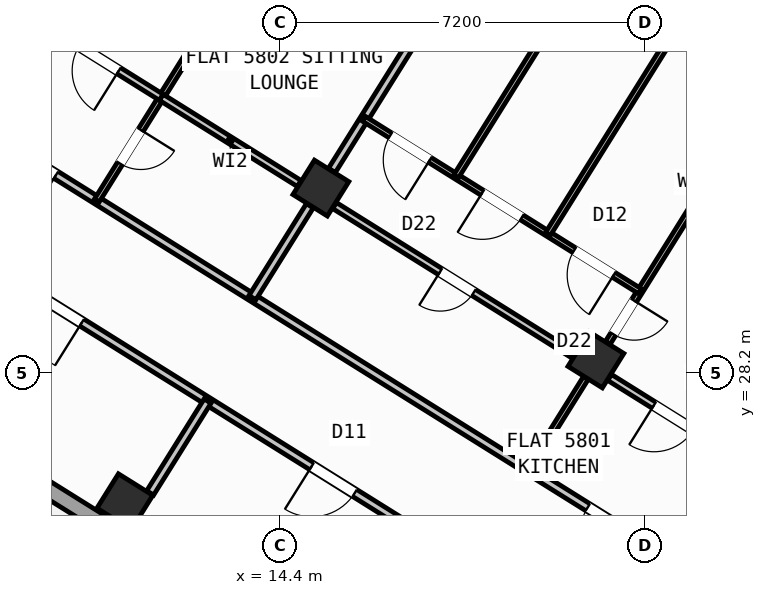
"""IFC4 building model, lengths in metres.
Left out: names, types, materials, properties, quantities, classifications, styles, units other than length and angle.
Written with IfcOpenShell. Run it as: python <this file> out.ifc"""

import sys

from ifc_helpers import new_model, si_unit, direction, frame, frame_2d, origin, origin_2d, place, context, subcontext, project, spatial, rectangle, hollow_rectangle, extrude, source, transform, mapped, element, fill, save


model = new_model("IFC4")
c1 = context("Model", 3, precision=1e-05, world=origin(), true_north=direction((0.0, 1.0)))
c2 = subcontext(c1, "Body", "Model", "MODEL_VIEW")
j1 = project(units=[si_unit("LENGTHUNIT", "METRE"), si_unit("PLANEANGLEUNIT", "RADIAN")], contexts=[c1])
p1 = place(None, origin())
s1 = spatial("IfcSite", under=j1, at=p1, CompositionType="ELEMENT")
p2 = place(p1, origin())
s2 = spatial("IfcBuilding", under=s1, at=p2, CompositionType="ELEMENT")
p3 = place(p2, frame((0.0, 0.0, 229.2)))
s3 = spatial("IfcBuildingStorey", under=s2, at=p3, CompositionType="ELEMENT", Elevation=229.2)
m1 = source(origin(), c2, "Body", "SweptSolid", [
    extrude(hollow_rectangle(XDim=0.8, YDim=0.8, WallThickness=0.032, at=origin_2d()), origin(), (0.0, 0.0, 1.0), 4.5),
])
for number, where, z_axis, x_axis in (
    (1, (20.632, 28.452, 0.0), (0.0, 0.0, 1.0), (-0.848, 0.53, 0.0)),
    (2, (15.205, 31.844, 0.0), (0.0, 0.0, 1.0), (-0.848, 0.53, 0.0)),
    (3, (11.336, 25.653, 0.0), (0.0, 0.0, 1.0), (-0.848, 0.53, 0.0)),
):
    element("IfcColumn", number, at=place(p3, frame(where, z_axis=z_axis, x_axis=x_axis)), inside=s3, PredefinedType="COLUMN", context=c2, shape_type="MappedRepresentation", body=[
        mapped(m1, transform((0.0, 0.0, 0.0), scale=1.0)),
    ])
p4 = place(p3, frame((31.76, 12.183, 0.0), z_axis=(0.0, 0.0, 1.0), x_axis=(-0.848047074256, 0.529920899612, 0.0)))
e4 = element("IfcWall", 4, at=p4, inside=s3, PredefinedType="STANDARD", context=c2, shape_type="SweptSolid", body=[
    extrude(rectangle(XDim=30.652, YDim=0.32, at=frame_2d((15.326, 0.0))), origin(), (0.0, 0.0, 1.0), 4.22),
])
p5 = place(p4, frame((14.966, 0.0, 0.0)))
e5 = element("IfcOpeningElement", 5, at=p5, cuts=e4, PredefinedType="OPENING", context=c2, shape_type="SweptSolid", body=[
    extrude(rectangle(XDim=1.2, YDim=2.15, at=frame_2d((0.6, 1.075))), frame((0.0, 0.17, 0.0), z_axis=(0.0, -1.0, 0.0), x_axis=(1.0, 0.0, 0.0)), (0.0, 0.0, 1.0), 0.34),
])
p6 = place(p4, frame((2.096, 0.0, 0.9)))
e6 = element("IfcOpeningElement", 6, at=p6, cuts=e4, PredefinedType="OPENING", context=c2, shape_type="SweptSolid", body=[
    extrude(rectangle(XDim=1.65, YDim=1.45, at=frame_2d((0.825, 0.725))), frame((0.0, 0.17, 0.0), z_axis=(0.0, -1.0, 0.0), x_axis=(1.0, 0.0, 0.0)), (0.0, 0.0, 1.0), 0.34),
])
p7 = place(p4, frame((6.771, 0.0, 0.9)))
e7 = element("IfcOpeningElement", 7, at=p7, cuts=e4, PredefinedType="OPENING", context=c2, shape_type="SweptSolid", body=[
    extrude(rectangle(XDim=1.65, YDim=1.45, at=frame_2d((0.825, 0.725))), frame((0.0, 0.17, 0.0), z_axis=(0.0, -1.0, 0.0), x_axis=(1.0, 0.0, 0.0)), (0.0, 0.0, 1.0), 0.34),
])
p8 = place(p4, frame((20.283, 0.0, 0.95)))
e8 = element("IfcOpeningElement", 8, at=p8, cuts=e4, PredefinedType="OPENING", context=c2, shape_type="SweptSolid", body=[
    extrude(rectangle(XDim=1.95, YDim=1.35, at=frame_2d((0.975, 0.675))), frame((0.0, 0.17, 0.0), z_axis=(0.0, -1.0, 0.0), x_axis=(1.0, 0.0, 0.0)), (0.0, 0.0, 1.0), 0.34),
])
p9 = place(p4, frame((27.208, 0.0, 1.0)))
e9 = element("IfcOpeningElement", 9, at=p9, cuts=e4, PredefinedType="OPENING", context=c2, shape_type="SweptSolid", body=[
    extrude(rectangle(XDim=0.9, YDim=1.25, at=frame_2d((0.45, 0.625))), frame((0.0, 0.17, 0.0), z_axis=(0.0, -1.0, 0.0), x_axis=(1.0, 0.0, 0.0)), (0.0, 0.0, 1.0), 0.34),
])
p10 = place(p3, frame((5.7, 28.71, 0.0), z_axis=(0.0, 0.0, 1.0), x_axis=(0.529923711467, 0.8480453172, 0.0)))
e10 = element("IfcWall", 10, at=p10, inside=s3, PredefinedType="STANDARD", context=c2, shape_type="SweptSolid", body=[
    extrude(rectangle(XDim=21.587, YDim=0.32, at=frame_2d((10.794, 0.0))), origin(), (0.0, 0.0, 1.0), 2.395),
])
p11 = place(p10, frame((5.859, 0.0, 1.0)))
e11 = element("IfcOpeningElement", 11, at=p11, cuts=e10, PredefinedType="OPENING", context=c2, shape_type="SweptSolid", body=[
    extrude(rectangle(XDim=0.9, YDim=1.25, at=frame_2d((0.45, 0.625))), frame((0.0, 0.17, 0.0), z_axis=(0.0, -1.0, 0.0), x_axis=(1.0, 0.0, 0.0)), (0.0, 0.0, 1.0), 0.34),
])
p12 = place(p10, frame((9.444, 0.0, 1.0)))
e12 = element("IfcOpeningElement", 12, at=p12, cuts=e10, PredefinedType="OPENING", context=c2, shape_type="SweptSolid", body=[
    extrude(rectangle(XDim=0.9, YDim=1.25, at=frame_2d((0.45, 0.625))), frame((0.0, 0.17, 0.0), z_axis=(0.0, -1.0, 0.0), x_axis=(1.0, 0.0, 0.0)), (0.0, 0.0, 1.0), 0.34),
])
p13 = place(p10, frame((12.344, 0.0, 1.0)))
e13 = element("IfcOpeningElement", 13, at=p13, cuts=e10, PredefinedType="OPENING", context=c2, shape_type="SweptSolid", body=[
    extrude(rectangle(XDim=0.9, YDim=1.25, at=frame_2d((0.45, 0.625))), frame((0.0, 0.17, 0.0), z_axis=(0.0, -1.0, 0.0), x_axis=(1.0, 0.0, 0.0)), (0.0, 0.0, 1.0), 0.34),
])
p14 = place(p10, frame((16.5, 0.0, 1.0)))
e14 = element("IfcOpeningElement", 14, at=p14, cuts=e10, PredefinedType="OPENING", context=c2, shape_type="SweptSolid", body=[
    extrude(rectangle(XDim=0.9, YDim=1.25, at=frame_2d((0.45, 0.625))), frame((0.0, 0.17, 0.0), z_axis=(0.0, -1.0, 0.0), x_axis=(1.0, 0.0, 0.0)), (0.0, 0.0, 1.0), 0.34),
])
p15 = place(p10, frame((18.913, 0.0, 1.0)))
e15 = element("IfcOpeningElement", 15, at=p15, cuts=e10, PredefinedType="OPENING", context=c2, shape_type="SweptSolid", body=[
    extrude(rectangle(XDim=0.9, YDim=1.25, at=frame_2d((0.45, 0.625))), frame((0.0, 0.17, 0.0), z_axis=(0.0, -1.0, 0.0), x_axis=(1.0, 0.0, 0.0)), (0.0, 0.0, 1.0), 0.34),
])
p16 = place(p3, frame((17.424, 47.083, 0.0), z_axis=(0.0, 0.0, 1.0), x_axis=(0.848049927979, -0.529916332693, 0.0)))
e16 = element("IfcWall", 16, at=p16, inside=s3, PredefinedType="STANDARD", context=c2, shape_type="SweptSolid", body=[
    extrude(rectangle(XDim=29.223, YDim=0.32, at=frame_2d((14.612, 0.0))), origin(), (0.0, 0.0, 1.0), 4.22),
])
p17 = place(p16, frame((3.709, 0.0, 0.0)))
e17 = element("IfcOpeningElement", 17, at=p17, cuts=e16, PredefinedType="OPENING", context=c2, shape_type="SweptSolid", body=[
    extrude(rectangle(XDim=1.05, YDim=2.15, at=frame_2d((0.525, 1.075))), frame((0.0, 0.17, 0.0), z_axis=(0.0, -1.0, 0.0), x_axis=(1.0, 0.0, 0.0)), (0.0, 0.0, 1.0), 0.34),
])
p18 = place(p16, frame((0.809, 0.0, 1.0)))
e18 = element("IfcOpeningElement", 18, at=p18, cuts=e16, PredefinedType="OPENING", context=c2, shape_type="SweptSolid", body=[
    extrude(rectangle(XDim=0.9, YDim=1.25, at=frame_2d((0.45, 0.625))), frame((0.0, 0.17, 0.0), z_axis=(0.0, -1.0, 0.0), x_axis=(1.0, 0.0, 0.0)), (0.0, 0.0, 1.0), 0.34),
])
p19 = place(p16, frame((13.811, 0.0, 0.9)))
e19 = element("IfcOpeningElement", 19, at=p19, cuts=e16, PredefinedType="OPENING", context=c2, shape_type="SweptSolid", body=[
    extrude(rectangle(XDim=1.35, YDim=1.45, at=frame_2d((0.675, 0.725))), frame((0.0, 0.17, 0.0), z_axis=(0.0, -1.0, 0.0), x_axis=(1.0, 0.0, 0.0)), (0.0, 0.0, 1.0), 0.34),
])
p20 = place(p16, frame((17.254, 0.0, 1.0)))
e20 = element("IfcOpeningElement", 20, at=p20, cuts=e16, PredefinedType="OPENING", context=c2, shape_type="SweptSolid", body=[
    extrude(rectangle(XDim=0.9, YDim=1.25, at=frame_2d((0.45, 0.625))), frame((0.0, 0.17, 0.0), z_axis=(0.0, -1.0, 0.0), x_axis=(1.0, 0.0, 0.0)), (0.0, 0.0, 1.0), 0.34),
])
p21 = place(p16, frame((21.364, 0.0, 1.0)))
e21 = element("IfcOpeningElement", 21, at=p21, cuts=e16, PredefinedType="OPENING", context=c2, shape_type="SweptSolid", body=[
    extrude(rectangle(XDim=0.9, YDim=1.25, at=frame_2d((0.45, 0.625))), frame((0.0, 0.17, 0.0), z_axis=(0.0, -1.0, 0.0), x_axis=(1.0, 0.0, 0.0)), (0.0, 0.0, 1.0), 0.34),
])
p22 = place(p16, frame((26.003, 0.0, 1.0)))
e22 = element("IfcOpeningElement", 22, at=p22, cuts=e16, PredefinedType="OPENING", context=c2, shape_type="SweptSolid", body=[
    extrude(rectangle(XDim=0.9, YDim=1.25, at=frame_2d((0.45, 0.625))), frame((0.0, 0.17, 0.0), z_axis=(0.0, -1.0, 0.0), x_axis=(1.0, 0.0, 0.0)), (0.0, 0.0, 1.0), 0.34),
])
p23 = place(p16, frame((11.211, 0.0, 1.0)))
e23 = element("IfcOpeningElement", 23, at=p23, cuts=e16, PredefinedType="OPENING", context=c2, shape_type="SweptSolid", body=[
    extrude(rectangle(XDim=0.65, YDim=1.15, at=frame_2d((0.325, 0.575))), frame((0.0, 0.17, 0.0), z_axis=(0.0, -1.0, 0.0), x_axis=(1.0, 0.0, 0.0)), (0.0, 0.0, 1.0), 0.34),
])
p24 = place(p16, frame((9.079, 0.0, 1.0)))
e24 = element("IfcOpeningElement", 24, at=p24, cuts=e16, PredefinedType="OPENING", context=c2, shape_type="SweptSolid", body=[
    extrude(rectangle(XDim=0.65, YDim=1.15, at=frame_2d((0.325, 0.575))), frame((0.0, 0.17, 0.0), z_axis=(0.0, -1.0, 0.0), x_axis=(1.0, 0.0, 0.0)), (0.0, 0.0, 1.0), 0.34),
])
p25 = place(p16, frame((6.951, 0.0, 1.0)))
e25 = element("IfcOpeningElement", 25, at=p25, cuts=e16, PredefinedType="OPENING", context=c2, shape_type="SweptSolid", body=[
    extrude(rectangle(XDim=0.65, YDim=1.15, at=frame_2d((0.325, 0.575))), frame((0.0, 0.17, 0.0), z_axis=(0.0, -1.0, 0.0), x_axis=(1.0, 0.0, 0.0)), (0.0, 0.0, 1.0), 0.34),
])
p26 = place(p3, frame((22.495, 24.281, 0.0), z_axis=(0.0, 0.0, 1.0), x_axis=(-0.848052408131, 0.529912363569, 0.0)))
e26 = element("IfcWall", 26, at=p26, inside=s3, PredefinedType="PARTITIONING", context=c2, shape_type="SweptSolid", body=[
    extrude(rectangle(XDim=16.73, YDim=0.16, at=frame_2d((8.365, 0.0))), origin(), (0.0, 0.0, 1.0), 4.21),
])
p27 = place(p26, frame((1.385, 0.0, 0.0)))
e27 = element("IfcOpeningElement", 27, at=p27, cuts=e26, PredefinedType="OPENING", context=c2, shape_type="SweptSolid", body=[
    extrude(rectangle(XDim=1.0, YDim=2.1, at=frame_2d((0.5, 1.05))), frame((0.0, 0.09, 0.0), z_axis=(0.0, -1.0, 0.0), x_axis=(1.0, 0.0, 0.0)), (0.0, 0.0, 1.0), 0.18),
])
p28 = place(p26, frame((14.76, 0.0, 0.0)))
e28 = element("IfcOpeningElement", 28, at=p28, cuts=e26, PredefinedType="OPENING", context=c2, shape_type="SweptSolid", body=[
    extrude(rectangle(XDim=1.0, YDim=2.1, at=frame_2d((0.5, 1.05))), frame((0.0, 0.09, 0.0), z_axis=(0.0, -1.0, 0.0), x_axis=(1.0, 0.0, 0.0)), (0.0, 0.0, 1.0), 0.18),
])
p29 = place(p3, frame((21.329, 22.416, 0.0), z_axis=(0.0, 0.0, 1.0), x_axis=(-0.848052408131, 0.529912363569, 0.0)))
e29 = element("IfcWall", 29, at=p29, inside=s3, PredefinedType="PARTITIONING", context=c2, shape_type="SweptSolid", body=[
    extrude(rectangle(XDim=16.73, YDim=0.16, at=frame_2d((8.365, 0.0))), origin(), (0.0, 0.0, 1.0), 4.21),
])
p30 = place(p29, frame((1.505, 0.0, 0.0)))
e30 = element("IfcOpeningElement", 30, at=p30, cuts=e29, PredefinedType="OPENING", context=c2, shape_type="SweptSolid", body=[
    extrude(rectangle(XDim=1.0, YDim=2.1, at=frame_2d((0.5, 1.05))), frame((0.0, 0.09, 0.0), z_axis=(0.0, -1.0, 0.0), x_axis=(1.0, 0.0, 0.0)), (0.0, 0.0, 1.0), 0.18),
])
p31 = place(p29, frame((6.435, 0.0, 0.0)))
e31 = element("IfcOpeningElement", 31, at=p31, cuts=e29, PredefinedType="OPENING", context=c2, shape_type="SweptSolid", body=[
    extrude(rectangle(XDim=1.0, YDim=2.1, at=frame_2d((0.5, 1.05))), frame((0.0, 0.09, 0.0), z_axis=(0.0, -1.0, 0.0), x_axis=(1.0, 0.0, 0.0)), (0.0, 0.0, 1.0), 0.18),
])
p32 = place(p29, frame((12.784, 0.0, 0.0)))
e32 = element("IfcOpeningElement", 32, at=p32, cuts=e29, PredefinedType="OPENING", context=c2, shape_type="SweptSolid", body=[
    extrude(rectangle(XDim=1.0, YDim=2.1, at=frame_2d((0.5, 1.05))), frame((0.0, 0.09, 0.0), z_axis=(0.0, -1.0, 0.0), x_axis=(1.0, 0.0, 0.0)), (0.0, 0.0, 1.0), 0.18),
])
p33 = place(p3, frame((12.968, 27.64, 0.0), z_axis=(0.0, 0.0, 1.0), x_axis=(-0.52989628283, -0.848062456098, 0.0)))
e33 = element("IfcWall", 33, at=p33, inside=s3, PredefinedType="PARTITIONING", context=c2, shape_type="SweptSolid", body=[
    extrude(rectangle(XDim=2.138, YDim=0.16, at=frame_2d((1.069, 0.0))), origin(), (0.0, 0.0, 1.0), 2.395),
])
p34 = place(p3, frame((18.854, 37.685, 0.0), z_axis=(0.0, 0.0, 1.0), x_axis=(-0.529907440938, -0.848055484057, 0.0)))
e34 = element("IfcWall", 34, at=p34, inside=s3, PredefinedType="PARTITIONING", context=c2, shape_type="SweptSolid", body=[
    extrude(rectangle(XDim=6.476, YDim=0.16, at=frame_2d((3.238, 0.0))), origin(), (0.0, 0.0, 1.0), 2.395),
])
p35 = place(p3, frame((14.986, 31.494, 0.0), z_axis=(0.0, 0.0, 1.0), x_axis=(-0.52989628283, -0.848062456098, 0.0)))
e35 = element("IfcWall", 35, at=p35, inside=s3, PredefinedType="PARTITIONING", context=c2, shape_type="SweptSolid", body=[
    extrude(rectangle(XDim=2.138, YDim=0.16, at=frame_2d((1.069, 0.0))), origin(), (0.0, 0.0, 1.0), 2.395),
])
p36 = place(p3, frame((24.299, 34.283, 0.0), z_axis=(0.0, 0.0, 1.0), x_axis=(-0.529890499457, -0.848066069705, 0.0)))
e36 = element("IfcWall", 36, at=p36, inside=s3, PredefinedType="PARTITIONING", context=c2, shape_type="SweptSolid", body=[
    extrude(rectangle(XDim=6.476, YDim=0.11, at=frame_2d((3.238, 0.0))), origin(), (0.0, 0.0, 1.0), 2.395),
])
p37 = place(p36, frame((5.496, 0.0, 0.0)))
e37 = element("IfcOpeningElement", 37, at=p37, cuts=e36, PredefinedType="OPENING", context=c2, shape_type="SweptSolid", body=[
    extrude(rectangle(XDim=0.78, YDim=2.05, at=frame_2d((0.39, 1.025))), frame((0.0, 0.065, 0.0), z_axis=(0.0, -1.0, 0.0), x_axis=(1.0, 0.0, 0.0)), (0.0, 0.0, 1.0), 0.13),
])
p38 = place(p3, frame((20.431, 28.092, 0.0), z_axis=(0.0, 0.0, 1.0), x_axis=(-0.529978410432, -0.848011134641, 0.0)))
e38 = element("IfcWall", 38, at=p38, inside=s3, PredefinedType="PARTITIONING", context=c2, shape_type="SweptSolid", body=[
    extrude(rectangle(XDim=2.138, YDim=0.11, at=frame_2d((1.069, 0.0))), origin(), (0.0, 0.0, 1.0), 2.395),
])
p39 = place(p3, frame((23.767, 26.316, 0.0), z_axis=(0.0, 0.0, 1.0), x_axis=(-0.848055143312, 0.529907986259, 0.0)))
e39 = element("IfcWall", 39, at=p39, inside=s3, PredefinedType="PLUMBINGWALL", context=c2, shape_type="SweptSolid", body=[
    extrude(rectangle(XDim=3.378, YDim=0.14, at=frame_2d((1.689, 0.0))), origin(), (0.0, 0.0, 1.0), 3.745),
])
p40 = place(p39, frame((1.425, 0.0, 0.0)))
e40 = element("IfcOpeningElement", 40, at=p40, cuts=e39, PredefinedType="OPENING", context=c2, shape_type="SweptSolid", body=[
    extrude(rectangle(XDim=0.92, YDim=2.08, at=frame_2d((0.46, 1.04))), frame((0.0, 0.08, 0.0), z_axis=(0.0, -1.0, 0.0), x_axis=(1.0, 0.0, 0.0)), (0.0, 0.0, 1.0), 0.16),
])
p41 = place(p3, frame((20.203, 28.543, 0.0), z_axis=(0.0, 0.0, 1.0), x_axis=(-0.848049955116, 0.529916289265, 0.0)))
e41 = element("IfcWall", 41, at=p41, inside=s3, PredefinedType="PLUMBINGWALL", context=c2, shape_type="SweptSolid", body=[
    extrude(rectangle(XDim=5.576, YDim=0.14, at=frame_2d((2.788, 0.0))), origin(), (0.0, 0.0, 1.0), 3.745),
])
p42 = place(p41, frame((2.338, 0.0, 0.0)))
e42 = element("IfcOpeningElement", 42, at=p42, cuts=e41, PredefinedType="OPENING", context=c2, shape_type="SweptSolid", body=[
    extrude(rectangle(XDim=0.78, YDim=2.05, at=frame_2d((0.39, 1.025))), frame((0.0, 0.08, 0.0), z_axis=(0.0, -1.0, 0.0), x_axis=(1.0, 0.0, 0.0)), (0.0, 0.0, 1.0), 0.16),
])
p43 = place(p3, frame((21.502, 29.807, 0.0), z_axis=(0.0, 0.0, 1.0), x_axis=(-0.848051709137, 0.529913482212, 0.0)))
e43 = element("IfcWall", 43, at=p43, inside=s3, PredefinedType="PARTITIONING", context=c2, shape_type="SweptSolid", body=[
    extrude(rectangle(XDim=6.42, YDim=0.11, at=frame_2d((3.21, 0.0))), origin(), (0.0, 0.0, 1.0), 4.21),
])
p44 = place(p43, frame((0.61, 0.0, 0.0)))
e44 = element("IfcOpeningElement", 44, at=p44, cuts=e43, PredefinedType="OPENING", context=c2, shape_type="SweptSolid", body=[
    extrude(rectangle(XDim=0.92, YDim=2.08, at=frame_2d((0.46, 1.04))), frame((0.0, 0.065, 0.0), z_axis=(0.0, -1.0, 0.0), x_axis=(1.0, 0.0, 0.0)), (0.0, 0.0, 1.0), 0.13),
])
p45 = place(p43, frame((2.75, 0.0, 0.0)))
e45 = element("IfcOpeningElement", 45, at=p45, cuts=e43, PredefinedType="OPENING", context=c2, shape_type="SweptSolid", body=[
    extrude(rectangle(XDim=0.92, YDim=2.08, at=frame_2d((0.46, 1.04))), frame((0.0, 0.065, 0.0), z_axis=(0.0, -1.0, 0.0), x_axis=(1.0, 0.0, 0.0)), (0.0, 0.0, 1.0), 0.13),
])
p46 = place(p43, frame((4.89, 0.0, 0.0)))
e46 = element("IfcOpeningElement", 46, at=p46, cuts=e43, PredefinedType="OPENING", context=c2, shape_type="SweptSolid", body=[
    extrude(rectangle(XDim=0.92, YDim=2.08, at=frame_2d((0.46, 1.04))), frame((0.0, 0.065, 0.0), z_axis=(0.0, -1.0, 0.0), x_axis=(1.0, 0.0, 0.0)), (0.0, 0.0, 1.0), 0.13),
])
p47 = place(p3, frame((26.37, 41.635, 0.0), z_axis=(0.0, 0.0, 1.0), x_axis=(-0.529925845384, -0.848043983761, 0.0)))
e47 = element("IfcWall", 47, at=p47, inside=s3, PredefinedType="PARTITIONING", context=c2, shape_type="SweptSolid", body=[
    extrude(rectangle(XDim=12.61, YDim=0.11, at=frame_2d((6.305, 0.0))), origin(), (0.0, 0.0, 1.0), 3.895),
])
p48 = place(p3, frame((24.555, 42.769, 0.0), z_axis=(0.0, 0.0, 1.0), x_axis=(-0.529911921261, -0.848052684511, 0.0)))
e48 = element("IfcWall", 48, at=p48, inside=s3, PredefinedType="PARTITIONING", context=c2, shape_type="SweptSolid", body=[
    extrude(rectangle(XDim=12.61, YDim=0.11, at=frame_2d((6.305, 0.0))), origin(), (0.0, 0.0, 1.0), 3.895),
])
p49 = place(p3, frame((19.67, 45.821, 0.0), z_axis=(0.0, 0.0, 1.0), x_axis=(-0.529920421309, -0.848047373134, 0.0)))
e49 = element("IfcWall", 49, at=p49, inside=s3, PredefinedType="PARTITIONING", context=c2, shape_type="SweptSolid", body=[
    extrude(rectangle(XDim=16.77, YDim=0.11, at=frame_2d((8.385, 0.0))), origin(), (0.0, 0.0, 1.0), 4.21),
])
p50 = place(p49, frame((15.13, 0.0, 0.0)))
e50 = element("IfcOpeningElement", 50, at=p50, cuts=e49, PredefinedType="OPENING", context=c2, shape_type="SweptSolid", body=[
    extrude(rectangle(XDim=0.78, YDim=2.05, at=frame_2d((0.39, 1.025))), frame((0.0, 0.065, 0.0), z_axis=(0.0, -1.0, 0.0), x_axis=(1.0, 0.0, 0.0)), (0.0, 0.0, 1.0), 0.13),
])
p51 = place(p49, frame((9.884, 0.0, 0.0)))
e51 = element("IfcOpeningElement", 51, at=p51, cuts=e49, PredefinedType="OPENING", context=c2, shape_type="SweptSolid", body=[
    extrude(rectangle(XDim=0.92, YDim=2.08, at=frame_2d((0.46, 1.04))), frame((0.0, 0.065, 0.0), z_axis=(0.0, -1.0, 0.0), x_axis=(1.0, 0.0, 0.0)), (0.0, 0.0, 1.0), 0.13),
])
p52 = place(p3, frame((12.055, 33.635, 0.0), z_axis=(0.0, 0.0, 1.0), x_axis=(-0.848102546264, 0.529832115883, 0.0)))
e52 = element("IfcWall", 52, at=p52, inside=s3, PredefinedType="PLUMBINGWALL", context=c2, shape_type="SweptSolid", body=[
    extrude(rectangle(XDim=2.368, YDim=0.14, at=frame_2d((1.184, 0.0))), origin(), (0.0, 0.0, 1.0), 3.745),
])
p53 = place(p52, frame((0.99, 0.0, 0.0)))
e53 = element("IfcOpeningElement", 53, at=p53, cuts=e52, PredefinedType="OPENING", context=c2, shape_type="SweptSolid", body=[
    extrude(rectangle(XDim=0.92, YDim=2.08, at=frame_2d((0.46, 1.04))), frame((0.0, 0.08, 0.0), z_axis=(0.0, -1.0, 0.0), x_axis=(1.0, 0.0, 0.0)), (0.0, 0.0, 1.0), 0.16),
])
p54 = place(p3, frame((14.776, 31.935, 0.0), z_axis=(0.0, 0.0, 1.0), x_axis=(-0.848011130036, 0.529978417802, 0.0)))
e54 = element("IfcWall", 54, at=p54, inside=s3, PredefinedType="PLUMBINGWALL", context=c2, shape_type="SweptSolid", body=[
    extrude(rectangle(XDim=3.208, YDim=0.14, at=frame_2d((1.604, 0.0))), origin(), (0.0, 0.0, 1.0), 3.745),
])
m2 = source(origin(), c2, "Body", "SweptSolid", [
    extrude(rectangle(XDim=1.0, YDim=2.1, at=frame_2d((0.5, 1.05))), frame((0.0, 0.025, 0.0), z_axis=(0.0, -1.0, 0.0), x_axis=(1.0, 0.0, 0.0)), (0.0, 0.0, 1.0), 0.05),
])
p55 = place(p31, origin())
e55 = element("IfcDoor", 55, at=p55, inside=s3, OperationType="SINGLE_SWING_RIGHT", PredefinedType="DOOR", context=c2, shape_type="MappedRepresentation", body=[
    mapped(m2, transform((0.0, 0.0, 0.0), scale=1.0)),
])
fill(e31, e55)
p56 = place(p32, origin())
e56 = element("IfcDoor", 56, at=p56, inside=s3, OperationType="SINGLE_SWING_LEFT", PredefinedType="DOOR", context=c2, shape_type="MappedRepresentation", body=[
    mapped(m2, transform((0.0, 0.0, 0.0), scale=1.0)),
])
fill(e32, e56)
p57 = place(p27, origin())
e57 = element("IfcDoor", 57, at=p57, inside=s3, OperationType="SINGLE_SWING_LEFT", PredefinedType="DOOR", context=c2, shape_type="MappedRepresentation", body=[
    mapped(m2, transform((0.0, 0.0, 0.0), scale=1.0)),
])
fill(e27, e57)
m3 = source(origin(), c2, "Body", "SweptSolid", [
    extrude(rectangle(XDim=0.92, YDim=2.08, at=frame_2d((0.46, 1.04))), frame((0.0, 0.025, 0.0), z_axis=(0.0, -1.0, 0.0), x_axis=(1.0, 0.0, 0.0)), (0.0, 0.0, 1.0), 0.05),
])
p58 = place(p40, origin())
e58 = element("IfcDoor", 58, at=p58, inside=s3, OperationType="SINGLE_SWING_RIGHT", PredefinedType="DOOR", context=c2, shape_type="MappedRepresentation", body=[
    mapped(m3, transform((0.0, 0.0, 0.0), scale=1.0)),
])
fill(e40, e58)
m4 = source(origin(), c2, "Body", "SweptSolid", [
    extrude(rectangle(XDim=0.78, YDim=2.05, at=frame_2d((0.39, 1.025))), frame((0.0, 0.025, 0.0), z_axis=(0.0, -1.0, 0.0), x_axis=(1.0, 0.0, 0.0)), (0.0, 0.0, 1.0), 0.05),
])
p59 = place(p37, origin())
e59 = element("IfcDoor", 59, at=p59, inside=s3, OperationType="SINGLE_SWING_LEFT", PredefinedType="DOOR", context=c2, shape_type="MappedRepresentation", body=[
    mapped(m4, transform((0.0, 0.0, 0.0), scale=1.0)),
])
fill(e37, e59)
p60 = place(p42, origin())
e60 = element("IfcDoor", 60, at=p60, inside=s3, OperationType="SINGLE_SWING_RIGHT", PredefinedType="DOOR", context=c2, shape_type="MappedRepresentation", body=[
    mapped(m4, transform((0.0, 0.0, 0.0), scale=1.0)),
])
fill(e42, e60)
p61 = place(p44, origin())
e61 = element("IfcDoor", 61, at=p61, inside=s3, OperationType="SINGLE_SWING_LEFT", PredefinedType="DOOR", context=c2, shape_type="MappedRepresentation", body=[
    mapped(m3, transform((0.0, 0.0, 0.0), scale=1.0)),
])
fill(e44, e61)
p62 = place(p45, origin())
e62 = element("IfcDoor", 62, at=p62, inside=s3, OperationType="SINGLE_SWING_RIGHT", PredefinedType="DOOR", context=c2, shape_type="MappedRepresentation", body=[
    mapped(m3, transform((0.0, 0.0, 0.0), scale=1.0)),
])
fill(e45, e62)
p63 = place(p46, origin())
e63 = element("IfcDoor", 63, at=p63, inside=s3, OperationType="SINGLE_SWING_LEFT", PredefinedType="DOOR", context=c2, shape_type="MappedRepresentation", body=[
    mapped(m3, transform((0.0, 0.0, 0.0), scale=1.0)),
])
fill(e46, e63)
p64 = place(p28, origin())
e64 = element("IfcDoor", 64, at=p64, inside=s3, OperationType="SINGLE_SWING_LEFT", PredefinedType="DOOR", context=c2, shape_type="MappedRepresentation", body=[
    mapped(m2, transform((0.0, 0.0, 0.0), scale=1.0)),
])
fill(e28, e64)
p65 = place(p53, origin())
e65 = element("IfcDoor", 65, at=p65, inside=s3, OperationType="SINGLE_SWING_LEFT", PredefinedType="DOOR", context=c2, shape_type="MappedRepresentation", body=[
    mapped(m3, transform((0.0, 0.0, 0.0), scale=1.0)),
])
fill(e53, e65)
p66 = place(p50, origin())
e66 = element("IfcDoor", 66, at=p66, inside=s3, OperationType="SINGLE_SWING_LEFT", PredefinedType="DOOR", context=c2, shape_type="MappedRepresentation", body=[
    mapped(m4, transform((0.0, 0.0, 0.0), scale=1.0)),
])
fill(e50, e66)
save(model, sys.argv[1])
